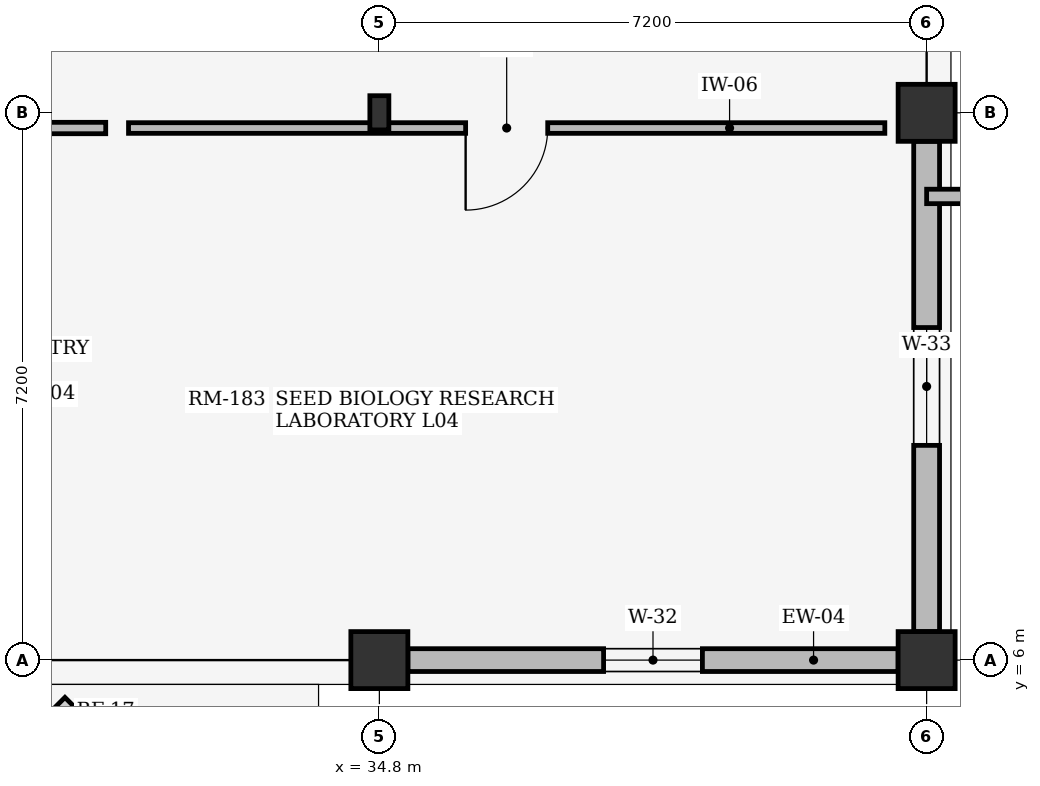
"""IFC4 building model, lengths in metres.
Left out: names, types, materials, properties, quantities, classifications, styles, units other than length and angle.
Written with IfcOpenShell. Run it as: python <this file> out.ifc"""

import sys

from ifc_helpers import new_model, si_unit, direction, frame, frame_2d, origin, origin_2d, place, context, subcontext, project, spatial, rectangle, i_section, extrude, element, fill, save


model = new_model("IFC4")
c1 = context("Model", 3, precision=1e-05, world=origin(), true_north=direction((0.0, 1.0)))
c2 = subcontext(c1, "Body", "Model", "MODEL_VIEW")
j1 = project(units=[si_unit("LENGTHUNIT", "METRE"), si_unit("PLANEANGLEUNIT", "RADIAN")], contexts=[c1])
p1 = place(None, origin())
s1 = spatial("IfcSite", under=j1, at=p1, CompositionType="ELEMENT")
p2 = place(p1, origin())
s2 = spatial("IfcBuilding", under=s1, at=p2, CompositionType="ELEMENT")
p3 = place(p2, frame((0.0, 0.0, 17.1)))
s3 = spatial("IfcBuildingStorey", under=s2, at=p3, CompositionType="ELEMENT", Elevation=17.1)
p4 = place(p3, frame((34.8, 6.0, 0.0), z_axis=(0.0, 0.0, 1.0), x_axis=(1.0, 0.0, 0.0)))
e1 = element("IfcColumn", 1, at=p4, inside=s3, PredefinedType="COLUMN", context=c2, shape_type="SweptSolid", body=[
    extrude(rectangle(XDim=0.75, YDim=0.75, at=origin_2d()), origin(), (0.0, 0.0, 1.0), 3.66),
])
p5 = place(p3, frame((34.8, 13.2, 0.0), z_axis=(0.0, 0.0, 1.0), x_axis=(1.0, 0.0, 0.0)))
e2 = element("IfcColumn", 2, at=p5, inside=s3, PredefinedType="COLUMN", context=c2, shape_type="SweptSolid", body=[
    extrude(i_section(OverallWidth=0.25, OverallDepth=0.45, WebThickness=0.011, FlangeThickness=0.014, at=origin_2d()), origin(), (0.0, 0.0, 1.0), 3.66),
])
for number, where, z_axis, x_axis in (
    (3, (42.0, 6.0, 0.0), (0.0, 0.0, 1.0), (1.0, 0.0, 0.0)),
    (4, (42.0, 13.2, 0.0), (0.0, 0.0, 1.0), (1.0, 0.0, 0.0)),
):
    element("IfcColumn", number, at=place(p3, frame(where, z_axis=z_axis, x_axis=x_axis)), inside=s3, PredefinedType="COLUMN", context=c2, shape_type="SweptSolid", body=[
        extrude(rectangle(XDim=0.75, YDim=0.75, at=origin_2d()), origin(), (0.0, 0.0, 1.0), 3.66),
    ])
p6 = place(p3, frame((35.175, 6.0, 0.0), z_axis=(0.0, 0.0, 1.0), x_axis=(1.0, 0.0, 0.0)))
e5 = element("IfcWall", 5, at=p6, inside=s3, PredefinedType="STANDARD", context=c2, shape_type="SweptSolid", body=[
    extrude(rectangle(XDim=6.45, YDim=0.3, at=frame_2d((3.225, 0.0))), origin(), (0.0, 0.0, 1.0), 3.04),
])
p7 = place(p6, frame((2.575, 0.0, 0.75)))
e6 = element("IfcOpeningElement", 6, at=p7, cuts=e5, PredefinedType="OPENING", context=c2, shape_type="SweptSolid", body=[
    extrude(rectangle(XDim=1.3, YDim=1.35, at=frame_2d((0.65, 0.675))), frame((0.0, 0.16, 0.0), z_axis=(0.0, -1.0, 0.0), x_axis=(1.0, 0.0, 0.0)), (0.0, 0.0, 1.0), 0.32),
])
p8 = place(p3, frame((42.0, 6.375, 0.0), z_axis=(0.0, 0.0, 1.0), x_axis=(0.0, 1.0, 0.0)))
e7 = element("IfcWall", 7, at=p8, inside=s3, PredefinedType="STANDARD", context=c2, shape_type="SweptSolid", body=[
    extrude(rectangle(XDim=6.45, YDim=0.34, at=frame_2d((3.225, 0.0))), origin(), (0.0, 0.0, 1.0), 3.04),
])
p9 = place(p8, frame((2.45, 0.0, 0.75)))
e8 = element("IfcOpeningElement", 8, at=p9, cuts=e7, PredefinedType="OPENING", context=c2, shape_type="SweptSolid", body=[
    extrude(rectangle(XDim=1.55, YDim=1.35, at=frame_2d((0.775, 0.675))), frame((0.0, 0.18, 0.0), z_axis=(0.0, -1.0, 0.0), x_axis=(1.0, 0.0, 0.0)), (0.0, 0.0, 1.0), 0.36),
])
p10 = place(p3, frame((42.0, 12.1, 0.0), z_axis=(0.0, 0.0, 1.0), x_axis=(1.0, 0.0, 0.0)))
e9 = element("IfcWall", 9, at=p10, inside=s3, PredefinedType="PARAPET", context=c2, shape_type="SweptSolid", body=[
    extrude(rectangle(XDim=46.1, YDim=0.19, at=frame_2d((23.05, 0.0))), origin(), (0.0, 0.0, 1.0), 1.2),
])
p11 = place(p3, frame((27.1, 13.0, 0.0), z_axis=(0.0, 0.0, 1.0), x_axis=(1.0, 0.0, 0.0)))
e10 = element("IfcWall", 10, at=p11, inside=s3, PredefinedType="PARTITIONING", context=c2, shape_type="SweptSolid", body=[
    extrude(rectangle(XDim=4.1, YDim=0.15, at=frame_2d((2.05, 0.0))), origin(), (0.0, 0.0, 1.0), 3.64),
])
p12 = place(p11, frame((1.56, 0.0, 0.0)))
e11 = element("IfcOpeningElement", 11, at=p12, cuts=e10, PredefinedType="OPENING", context=c2, shape_type="SweptSolid", body=[
    extrude(rectangle(XDim=0.98, YDim=2.1, at=frame_2d((0.49, 1.05))), frame((0.0, 0.085, 0.0), z_axis=(0.0, -1.0, 0.0), x_axis=(1.0, 0.0, 0.0)), (0.0, 0.0, 1.0), 0.17),
])
p13 = place(p3, frame((31.5, 13.0, 0.0), z_axis=(0.0, 0.0, 1.0), x_axis=(1.0, 0.0, 0.0)))
e12 = element("IfcWall", 12, at=p13, inside=s3, PredefinedType="PARTITIONING", context=c2, shape_type="SweptSolid", body=[
    extrude(rectangle(XDim=9.95, YDim=0.14, at=frame_2d((4.975, 0.0))), origin(), (0.0, 0.0, 1.0), 3.64),
])
p14 = place(p13, frame((4.435, 0.0, 0.0)))
e13 = element("IfcOpeningElement", 13, at=p14, cuts=e12, PredefinedType="OPENING", context=c2, shape_type="SweptSolid", body=[
    extrude(rectangle(XDim=1.08, YDim=2.1, at=frame_2d((0.54, 1.05))), frame((0.0, 0.08, 0.0), z_axis=(0.0, -1.0, 0.0), x_axis=(1.0, 0.0, 0.0)), (0.0, 0.0, 1.0), 0.16),
])
p15 = place(p7, origin())
e14 = element("IfcWindow", 14, at=p15, inside=s3, PartitioningType="SINGLE_PANEL", PredefinedType="WINDOW", context=c2, shape_type="SweptSolid", body=[
    extrude(rectangle(XDim=1.3, YDim=1.35, at=frame_2d((0.65, 0.675))), frame((0.0, 0.03, 0.0), z_axis=(0.0, -1.0, 0.0), x_axis=(1.0, 0.0, 0.0)), (0.0, 0.0, 1.0), 0.06),
])
fill(e6, e14)
p16 = place(p9, origin())
e15 = element("IfcWindow", 15, at=p16, inside=s3, PartitioningType="SINGLE_PANEL", PredefinedType="WINDOW", context=c2, shape_type="SweptSolid", body=[
    extrude(rectangle(XDim=1.55, YDim=1.35, at=frame_2d((0.775, 0.675))), frame((0.0, 0.03, 0.0), z_axis=(0.0, -1.0, 0.0), x_axis=(1.0, 0.0, 0.0)), (0.0, 0.0, 1.0), 0.06),
])
fill(e8, e15)
p17 = place(p14, frame((1.08, 0.0, 0.0), z_axis=(0.0, 0.0, 1.0), x_axis=(-1.0, 0.0, 0.0)))
e16 = element("IfcDoor", 16, at=p17, inside=s3, OperationType="SINGLE_SWING_LEFT", PredefinedType="DOOR", context=c2, shape_type="SweptSolid", body=[
    extrude(rectangle(XDim=1.08, YDim=2.1, at=frame_2d((0.54, 1.05))), frame((0.0, 0.025, 0.0), z_axis=(0.0, -1.0, 0.0), x_axis=(1.0, 0.0, 0.0)), (0.0, 0.0, 1.0), 0.05),
])
fill(e13, e16)
save(model, sys.argv[1])
